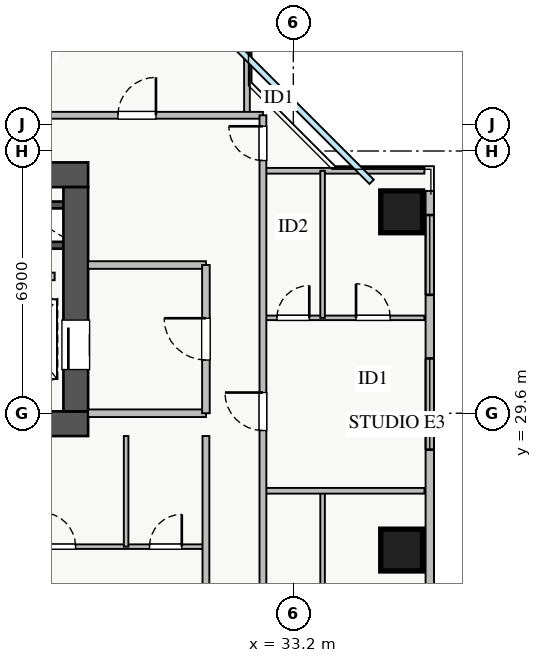
"""IFC4 building model, lengths in metres.
Left out: names, types, materials, properties, quantities, classifications, styles, units other than length and angle.
Written with IfcOpenShell. Run it as: python <this file> out.ifc"""

import sys

from ifc_helpers import new_model, si_unit, direction, frame, frame_2d, origin, origin_2d, place, context, subcontext, project, spatial, rectangle, extrude, source, transform, mapped, element, fill, save


model = new_model("IFC4")
c1 = context("Model", 3, precision=1e-05, world=origin(), true_north=direction((0.0, 1.0)))
c2 = subcontext(c1, "Body", "Model", "MODEL_VIEW")
j1 = project(units=[si_unit("LENGTHUNIT", "METRE"), si_unit("PLANEANGLEUNIT", "RADIAN")], contexts=[c1])
p1 = place(None, origin())
s1 = spatial("IfcSite", under=j1, at=p1, CompositionType="ELEMENT")
p2 = place(p1, origin())
s2 = spatial("IfcBuilding", under=s1, at=p2, CompositionType="ELEMENT")
p3 = place(p2, frame((0.0, 0.0, 97.0)))
s3 = spatial("IfcBuildingStorey", under=s2, at=p3, CompositionType="ELEMENT", Elevation=97.0)
for number, where, z_axis, x_axis in (
    (1, (25.8, 35.08, 0.0), (0.0, 0.0, 1.0), (1.0, 0.0, 0.0)),
    (2, (25.8, 34.02, 0.0), (0.0, 0.0, 1.0), (1.0, 0.0, 0.0)),
):
    element("IfcWall", number, at=place(p3, frame(where, z_axis=z_axis, x_axis=x_axis)), inside=s3, PredefinedType="SHEAR", context=c2, shape_type="SweptSolid", body=[
        extrude(rectangle(XDim=1.35, YDim=0.18, at=frame_2d((0.675, 0.0))), origin(), (0.0, 0.0, 1.0), 3.07),
    ])
p4 = place(p3, frame((10.2, 29.325, 0.0), z_axis=(0.0, 0.0, 1.0), x_axis=(1.0, 0.0, 0.0)))
e3 = element("IfcWall", 3, at=p4, inside=s3, PredefinedType="SHEAR", context=c2, shape_type="SweptSolid", body=[
    extrude(rectangle(XDim=17.6, YDim=0.65, at=frame_2d((8.8, 0.0))), origin(), (0.0, 0.0, 1.0), 3.25),
])
p5 = place(p3, frame((10.2, 35.875, 0.0), z_axis=(0.0, 0.0, 1.0), x_axis=(1.0, 0.0, 0.0)))
e4 = element("IfcWall", 4, at=p5, inside=s3, PredefinedType="SHEAR", context=c2, shape_type="SweptSolid", body=[
    extrude(rectangle(XDim=17.6, YDim=0.65, at=frame_2d((8.8, 0.0))), origin(), (0.0, 0.0, 1.0), 3.25),
])
p6 = place(p5, frame((1.15, 0.0, 0.0)))
e5 = element("IfcOpeningElement", 5, at=p6, cuts=e4, PredefinedType="OPENING", context=c2, shape_type="SweptSolid", body=[
    extrude(rectangle(XDim=1.1, YDim=2.05, at=frame_2d((0.55, 1.025))), frame((0.0, 0.335, 0.0), z_axis=(0.0, -1.0, 0.0), x_axis=(1.0, 0.0, 0.0)), (0.0, 0.0, 1.0), 0.67),
])
p7 = place(p5, frame((8.3, 0.0, 0.0)))
e6 = element("IfcOpeningElement", 6, at=p7, cuts=e4, PredefinedType="OPENING", context=c2, shape_type="SweptSolid", body=[
    extrude(rectangle(XDim=1.1, YDim=2.05, at=frame_2d((0.55, 1.025))), frame((0.0, 0.335, 0.0), z_axis=(0.0, -1.0, 0.0), x_axis=(1.0, 0.0, 0.0)), (0.0, 0.0, 1.0), 0.67),
])
p8 = place(p5, frame((4.9, 0.0, 0.0)))
e7 = element("IfcOpeningElement", 7, at=p8, cuts=e4, PredefinedType="OPENING", context=c2, shape_type="SweptSolid", body=[
    extrude(rectangle(XDim=1.1, YDim=2.05, at=frame_2d((0.55, 1.025))), frame((0.0, 0.335, 0.0), z_axis=(0.0, -1.0, 0.0), x_axis=(1.0, 0.0, 0.0)), (0.0, 0.0, 1.0), 0.67),
])
p9 = place(p5, frame((14.74, 0.0, 0.0)))
e8 = element("IfcOpeningElement", 8, at=p9, cuts=e4, PredefinedType="OPENING", context=c2, shape_type="SweptSolid", body=[
    extrude(rectangle(XDim=1.0, YDim=2.05, at=frame_2d((0.5, 1.025))), frame((0.0, 0.335, 0.0), z_axis=(0.0, -1.0, 0.0), x_axis=(1.0, 0.0, 0.0)), (0.0, 0.0, 1.0), 0.67),
])
p10 = place(p5, frame((10.175, 0.0, 0.0)))
e9 = element("IfcOpeningElement", 9, at=p10, cuts=e4, PredefinedType="OPENING", context=c2, shape_type="SweptSolid", body=[
    extrude(rectangle(XDim=1.0, YDim=2.05, at=frame_2d((0.5, 1.025))), frame((0.0, 0.335, 0.0), z_axis=(0.0, -1.0, 0.0), x_axis=(1.0, 0.0, 0.0)), (0.0, 0.0, 1.0), 0.67),
])
p11 = place(p5, frame((12.625, 0.0, 0.0)))
e10 = element("IfcOpeningElement", 10, at=p11, cuts=e4, PredefinedType="OPENING", context=c2, shape_type="SweptSolid", body=[
    extrude(rectangle(XDim=1.0, YDim=2.05, at=frame_2d((0.5, 1.025))), frame((0.0, 0.335, 0.0), z_axis=(0.0, -1.0, 0.0), x_axis=(1.0, 0.0, 0.0)), (0.0, 0.0, 1.0), 0.67),
])
p12 = place(p3, frame((27.475, 29.65, 0.0), z_axis=(0.0, 0.0, 1.0), x_axis=(0.0, 1.0, 0.0)))
e11 = element("IfcWall", 11, at=p12, inside=s3, PredefinedType="SHEAR", context=c2, shape_type="SweptSolid", body=[
    extrude(rectangle(XDim=5.9, YDim=0.65, at=frame_2d((2.95, 0.0))), origin(), (0.0, 0.0, 1.0), 3.25),
])
p13 = place(p12, frame((1.1, 0.0, 0.0)))
e12 = element("IfcOpeningElement", 12, at=p13, cuts=e11, PredefinedType="OPENING", context=c2, shape_type="SweptSolid", body=[
    extrude(rectangle(XDim=1.3, YDim=2.05, at=frame_2d((0.65, 1.025))), frame((0.0, 0.335, 0.0), z_axis=(0.0, -1.0, 0.0), x_axis=(1.0, 0.0, 0.0)), (0.0, 0.0, 1.0), 0.67),
])
m1 = source(origin(), c2, "Body", "SweptSolid", [
    extrude(rectangle(XDim=1.1, YDim=1.1, at=origin_2d()), origin(), (0.0, 0.0, 1.0), 3.25),
])
for number, where, z_axis, x_axis in (
    (13, (36.05, 26.0, 0.0), (0.0, 0.0, 1.0), (1.0, 0.0, 0.0)),
    (14, (36.05, 34.9, 0.0), (0.0, 0.0, 1.0), (1.0, 0.0, 0.0)),
):
    element("IfcColumn", number, at=place(p3, frame(where, z_axis=z_axis, x_axis=x_axis)), inside=s3, PredefinedType="COLUMN", context=c2, shape_type="MappedRepresentation", body=[
        mapped(m1, transform((0.0, 0.0, 0.0), x_axis=(1.0, 0.0, 0.0), y_axis=(0.0, 1.0, 0.0), z_axis=(0.0, 0.0, 1.0), scale=1.0)),
    ])
p14 = place(p3, frame((36.79, 10.55, 0.0), z_axis=(0.0, 0.0, 1.0), x_axis=(0.0, 1.0, 0.0)))
e15 = element("IfcWall", 15, at=p14, inside=s3, PredefinedType="STANDARD", context=c2, shape_type="SweptSolid", body=[
    extrude(rectangle(XDim=24.9, YDim=0.22, at=frame_2d((12.45, 0.0))), origin(), (0.0, 0.0, 1.0), 2.61),
])
p15 = place(p14, frame((1.912, 0.0, 0.9)))
e16 = element("IfcOpeningElement", 16, at=p15, cuts=e15, PredefinedType="OPENING", context=c2, shape_type="SweptSolid", body=[
    extrude(rectangle(XDim=2.4, YDim=1.48, at=frame_2d((1.2, 0.74))), frame((0.0, 0.12, 0.0), z_axis=(0.0, -1.0, 0.0), x_axis=(1.0, 0.0, 0.0)), (0.0, 0.0, 1.0), 0.24),
])
p16 = place(p14, frame((22.165, 0.0, 0.9)))
e17 = element("IfcOpeningElement", 17, at=p16, cuts=e15, PredefinedType="OPENING", context=c2, shape_type="SweptSolid", body=[
    extrude(rectangle(XDim=2.1, YDim=1.5, at=frame_2d((1.05, 0.75))), frame((0.0, 0.12, 0.0), z_axis=(0.0, -1.0, 0.0), x_axis=(1.0, 0.0, 0.0)), (0.0, 0.0, 1.0), 0.24),
])
p17 = place(p14, frame((18.093, 0.0, 0.9)))
e18 = element("IfcOpeningElement", 18, at=p17, cuts=e15, PredefinedType="OPENING", context=c2, shape_type="SweptSolid", body=[
    extrude(rectangle(XDim=2.4, YDim=1.5, at=frame_2d((1.2, 0.75))), frame((0.0, 0.12, 0.0), z_axis=(0.0, -1.0, 0.0), x_axis=(1.0, 0.0, 0.0)), (0.0, 0.0, 1.0), 0.24),
])
p18 = place(p14, frame((9.045, 0.0, 0.9)))
e19 = element("IfcOpeningElement", 19, at=p18, cuts=e15, PredefinedType="OPENING", context=c2, shape_type="SweptSolid", body=[
    extrude(rectangle(XDim=0.9, YDim=1.2, at=frame_2d((0.45, 0.6))), frame((0.0, 0.12, 0.0), z_axis=(0.0, -1.0, 0.0), x_axis=(1.0, 0.0, 0.0)), (0.0, 0.0, 1.0), 0.24),
])
for number, where, z_axis, x_axis in (
    (20, (27.8, 29.6, 0.0), (0.0, 0.0, 1.0), (1.0, 0.0, 0.0)),
    (21, (27.8, 33.5, 0.0), (0.0, 0.0, 1.0), (1.0, 0.0, 0.0)),
):
    element("IfcWall", number, at=place(p3, frame(where, z_axis=z_axis, x_axis=x_axis)), inside=s3, PredefinedType="PARTITIONING", context=c2, shape_type="SweptSolid", body=[
        extrude(rectangle(XDim=3.1, YDim=0.2, at=frame_2d((1.55, 0.0))), origin(), (0.0, 0.0, 1.0), 3.07),
    ])
p19 = place(p3, frame((30.9, 29.6, 0.0), z_axis=(0.0, 0.0, 1.0), x_axis=(0.0, 1.0, 0.0)))
e22 = element("IfcWall", 22, at=p19, inside=s3, PredefinedType="PARTITIONING", context=c2, shape_type="SweptSolid", body=[
    extrude(rectangle(XDim=3.9, YDim=0.2, at=frame_2d((1.95, 0.0))), origin(), (0.0, 0.0, 1.0), 3.07),
])
p20 = place(p19, frame((1.4, 0.0, 0.0)))
e23 = element("IfcOpeningElement", 23, at=p20, cuts=e22, PredefinedType="OPENING", context=c2, shape_type="SweptSolid", body=[
    extrude(rectangle(XDim=1.1, YDim=2.05, at=frame_2d((0.55, 1.025))), frame((0.0, 0.11, 0.0), z_axis=(0.0, -1.0, 0.0), x_axis=(1.0, 0.0, 0.0)), (0.0, 0.0, 1.0), 0.22),
])
p21 = place(p3, frame((21.75, 33.2, 0.0), z_axis=(0.0, 0.0, 1.0), x_axis=(1.0, 0.0, 0.0)))
e24 = element("IfcWall", 24, at=p21, inside=s3, PredefinedType="PARTITIONING", context=c2, shape_type="SweptSolid", body=[
    extrude(rectangle(XDim=5.17, YDim=0.2, at=frame_2d((2.585, 0.0))), origin(), (0.0, 0.0, 1.0), 3.07),
])
p22 = place(p3, frame((31.98, 37.44, 0.0), z_axis=(0.0, 0.0, 1.0), x_axis=(0.0, 1.0, 0.0)))
e25 = element("IfcWall", 25, at=p22, inside=s3, PredefinedType="PARTITIONING", context=c2, shape_type="SweptSolid", body=[
    extrude(rectangle(XDim=3.21, YDim=0.15, at=frame_2d((1.605, 0.0))), origin(), (0.0, 0.0, 1.0), 3.07),
])
p23 = place(p3, frame((8.82, 37.44, 0.0), z_axis=(0.0, 0.0, 1.0), x_axis=(1.0, 0.0, 0.0)))
e26 = element("IfcWall", 26, at=p23, inside=s3, PredefinedType="PARTITIONING", context=c2, shape_type="SweptSolid", body=[
    extrude(rectangle(XDim=23.58, YDim=0.18, at=frame_2d((11.79, 0.0))), origin(), (0.0, 0.0, 1.0), 3.07),
])
p24 = place(p23, frame((2.75, 0.0, 0.0)))
e27 = element("IfcOpeningElement", 27, at=p24, cuts=e26, PredefinedType="OPENING", context=c2, shape_type="SweptSolid", body=[
    extrude(rectangle(XDim=1.0, YDim=2.05, at=frame_2d((0.5, 1.025))), frame((0.0, 0.1, 0.0), z_axis=(0.0, -1.0, 0.0), x_axis=(1.0, 0.0, 0.0)), (0.0, 0.0, 1.0), 0.2),
])
p25 = place(p23, frame((7.89, 0.0, 0.0)))
e28 = element("IfcOpeningElement", 28, at=p25, cuts=e26, PredefinedType="OPENING", context=c2, shape_type="SweptSolid", body=[
    extrude(rectangle(XDim=1.0, YDim=2.05, at=frame_2d((0.5, 1.025))), frame((0.0, 0.1, 0.0), z_axis=(0.0, -1.0, 0.0), x_axis=(1.0, 0.0, 0.0)), (0.0, 0.0, 1.0), 0.2),
])
p26 = place(p23, frame((13.325, 0.0, 0.0)))
e29 = element("IfcOpeningElement", 29, at=p26, cuts=e26, PredefinedType="OPENING", context=c2, shape_type="SweptSolid", body=[
    extrude(rectangle(XDim=1.0, YDim=2.05, at=frame_2d((0.5, 1.025))), frame((0.0, 0.1, 0.0), z_axis=(0.0, -1.0, 0.0), x_axis=(1.0, 0.0, 0.0)), (0.0, 0.0, 1.0), 0.2),
])
p27 = place(p23, frame((19.765, 0.0, 0.0)))
e30 = element("IfcOpeningElement", 30, at=p27, cuts=e26, PredefinedType="OPENING", context=c2, shape_type="SweptSolid", body=[
    extrude(rectangle(XDim=1.0, YDim=2.05, at=frame_2d((0.5, 1.025))), frame((0.0, 0.1, 0.0), z_axis=(0.0, -1.0, 0.0), x_axis=(1.0, 0.0, 0.0)), (0.0, 0.0, 1.0), 0.2),
])
p28 = place(p3, frame((32.4, 35.98, 0.0), z_axis=(0.0, 0.0, 1.0), x_axis=(1.0, 0.0, 0.0)))
e31 = element("IfcWall", 31, at=p28, inside=s3, PredefinedType="PARTITIONING", context=c2, shape_type="SweptSolid", body=[
    extrude(rectangle(XDim=4.25, YDim=0.15, at=frame_2d((2.125, 0.0))), origin(), (0.0, 0.0, 1.0), 3.07),
])
p29 = place(p3, frame((33.97, 23.1, 0.0), z_axis=(0.0, 0.0, 1.0), x_axis=(0.0, 1.0, 0.0)))
e32 = element("IfcWall", 32, at=p29, inside=s3, PredefinedType="PLUMBINGWALL", context=c2, shape_type="SweptSolid", body=[
    extrude(rectangle(XDim=4.46, YDim=0.12, at=frame_2d((2.23, 0.0))), origin(), (0.0, 0.0, 1.0), 3.07),
])
p30 = place(p3, frame((32.4, 32.11, 0.0), z_axis=(0.0, 0.0, 1.0), x_axis=(1.0, 0.0, 0.0)))
e33 = element("IfcWall", 33, at=p30, inside=s3, PredefinedType="PLUMBINGWALL", context=c2, shape_type="SweptSolid", body=[
    extrude(rectangle(XDim=4.25, YDim=0.12, at=frame_2d((2.125, 0.0))), origin(), (0.0, 0.0, 1.0), 3.07),
])
p31 = place(p30, frame((0.37, 0.0, 0.0)))
e34 = element("IfcOpeningElement", 34, at=p31, cuts=e33, PredefinedType="OPENING", context=c2, shape_type="SweptSolid", body=[
    extrude(rectangle(XDim=0.85, YDim=2.05, at=frame_2d((0.425, 1.025))), frame((0.0, 0.07, 0.0), z_axis=(0.0, -1.0, 0.0), x_axis=(1.0, 0.0, 0.0)), (0.0, 0.0, 1.0), 0.14),
])
p32 = place(p30, frame((2.45, 0.0, 0.0)))
e35 = element("IfcOpeningElement", 35, at=p32, cuts=e33, PredefinedType="OPENING", context=c2, shape_type="SweptSolid", body=[
    extrude(rectangle(XDim=0.9, YDim=2.05, at=frame_2d((0.45, 1.025))), frame((0.0, 0.07, 0.0), z_axis=(0.0, -1.0, 0.0), x_axis=(1.0, 0.0, 0.0)), (0.0, 0.0, 1.0), 0.14),
])
p33 = place(p3, frame((33.97, 32.11, 0.0), z_axis=(0.0, 0.0, 1.0), x_axis=(0.0, 1.0, 0.0)))
e36 = element("IfcWall", 36, at=p33, inside=s3, PredefinedType="PLUMBINGWALL", context=c2, shape_type="SweptSolid", body=[
    extrude(rectangle(XDim=3.87, YDim=0.12, at=frame_2d((1.935, 0.0))), origin(), (0.0, 0.0, 1.0), 3.07),
])
p34 = place(p3, frame((32.4, 27.56, 0.0), z_axis=(0.0, 0.0, 1.0), x_axis=(1.0, 0.0, 0.0)))
e37 = element("IfcWall", 37, at=p34, inside=s3, PredefinedType="PARTITIONING", context=c2, shape_type="SweptSolid", body=[
    extrude(rectangle(XDim=4.25, YDim=0.15, at=frame_2d((2.125, 0.0))), origin(), (0.0, 0.0, 1.0), 3.07),
])
p35 = place(p3, frame((32.4, 8.31, 0.0), z_axis=(0.0, 0.0, 1.0), x_axis=(0.0, 1.0, 0.0)))
e38 = element("IfcWall", 38, at=p35, inside=s3, PredefinedType="PARTITIONING", context=c2, shape_type="SweptSolid", body=[
    extrude(rectangle(XDim=29.13, YDim=0.18, at=frame_2d((14.565, 0.0))), origin(), (0.0, 0.0, 1.0), 3.07),
])
p36 = place(p35, frame((27.94, 0.0, 0.0)))
e39 = element("IfcOpeningElement", 39, at=p36, cuts=e38, PredefinedType="OPENING", context=c2, shape_type="SweptSolid", body=[
    extrude(rectangle(XDim=0.9, YDim=2.05, at=frame_2d((0.45, 1.025))), frame((0.0, 0.1, 0.0), z_axis=(0.0, -1.0, 0.0), x_axis=(1.0, 0.0, 0.0)), (0.0, 0.0, 1.0), 0.2),
])
p37 = place(p35, frame((0.415, 0.0, 0.0)))
e40 = element("IfcOpeningElement", 40, at=p37, cuts=e38, PredefinedType="OPENING", context=c2, shape_type="SweptSolid", body=[
    extrude(rectangle(XDim=0.9, YDim=2.05, at=frame_2d((0.45, 1.025))), frame((0.0, 0.1, 0.0), z_axis=(0.0, -1.0, 0.0), x_axis=(1.0, 0.0, 0.0)), (0.0, 0.0, 1.0), 0.2),
])
p38 = place(p35, frame((5.88, 0.0, 0.0)))
e41 = element("IfcOpeningElement", 41, at=p38, cuts=e38, PredefinedType="OPENING", context=c2, shape_type="SweptSolid", body=[
    extrude(rectangle(XDim=1.0, YDim=2.05, at=frame_2d((0.5, 1.025))), frame((0.0, 0.1, 0.0), z_axis=(0.0, -1.0, 0.0), x_axis=(1.0, 0.0, 0.0)), (0.0, 0.0, 1.0), 0.2),
])
p39 = place(p35, frame((12.23, 0.0, 0.0)))
e42 = element("IfcOpeningElement", 42, at=p39, cuts=e38, PredefinedType="OPENING", context=c2, shape_type="SweptSolid", body=[
    extrude(rectangle(XDim=1.0, YDim=2.05, at=frame_2d((0.5, 1.025))), frame((0.0, 0.1, 0.0), z_axis=(0.0, -1.0, 0.0), x_axis=(1.0, 0.0, 0.0)), (0.0, 0.0, 1.0), 0.2),
])
p40 = place(p35, frame((20.835, 0.0, 0.0)))
e43 = element("IfcOpeningElement", 43, at=p40, cuts=e38, PredefinedType="OPENING", context=c2, shape_type="SweptSolid", body=[
    extrude(rectangle(XDim=1.0, YDim=2.05, at=frame_2d((0.5, 1.025))), frame((0.0, 0.1, 0.0), z_axis=(0.0, -1.0, 0.0), x_axis=(1.0, 0.0, 0.0)), (0.0, 0.0, 1.0), 0.2),
])
p41 = place(p3, frame((25.22, 26.09, 0.0), z_axis=(0.0, 0.0, 1.0), x_axis=(1.0, 0.0, 0.0)))
e44 = element("IfcWall", 44, at=p41, inside=s3, PredefinedType="PLUMBINGWALL", context=c2, shape_type="SweptSolid", body=[
    extrude(rectangle(XDim=5.68, YDim=0.12, at=frame_2d((2.84, 0.0))), origin(), (0.0, 0.0, 1.0), 2.625),
])
p42 = place(p41, frame((1.35, 0.0, 0.0)))
e45 = element("IfcOpeningElement", 45, at=p42, cuts=e44, PredefinedType="OPENING", context=c2, shape_type="SweptSolid", body=[
    extrude(rectangle(XDim=0.9, YDim=2.05, at=frame_2d((0.45, 1.025))), frame((0.0, 0.07, 0.0), z_axis=(0.0, -1.0, 0.0), x_axis=(1.0, 0.0, 0.0)), (0.0, 0.0, 1.0), 0.14),
])
p43 = place(p41, frame((4.195, 0.0, 0.0)))
e46 = element("IfcOpeningElement", 46, at=p43, cuts=e44, PredefinedType="OPENING", context=c2, shape_type="SweptSolid", body=[
    extrude(rectangle(XDim=0.85, YDim=2.05, at=frame_2d((0.425, 1.025))), frame((0.0, 0.07, 0.0), z_axis=(0.0, -1.0, 0.0), x_axis=(1.0, 0.0, 0.0)), (0.0, 0.0, 1.0), 0.14),
])
p44 = place(p3, frame((28.8, 26.09, 0.0), z_axis=(0.0, 0.0, 1.0), x_axis=(0.0, 1.0, 0.0)))
e47 = element("IfcWall", 47, at=p44, inside=s3, PredefinedType="PLUMBINGWALL", context=c2, shape_type="SweptSolid", body=[
    extrude(rectangle(XDim=2.91, YDim=0.12, at=frame_2d((1.455, 0.0))), origin(), (0.0, 0.0, 1.0), 3.07),
])
p45 = place(p3, frame((30.9, 17.0, 0.0), z_axis=(0.0, 0.0, 1.0), x_axis=(0.0, 1.0, 0.0)))
e48 = element("IfcWall", 48, at=p45, inside=s3, PredefinedType="PARTITIONING", context=c2, shape_type="SweptSolid", body=[
    extrude(rectangle(XDim=12.0, YDim=0.18, at=frame_2d((6.0, 0.0))), origin(), (0.0, 0.0, 1.0), 3.07),
])
p46 = place(p45, frame((0.84, 0.0, 0.0)))
e49 = element("IfcOpeningElement", 49, at=p46, cuts=e48, PredefinedType="OPENING", context=c2, shape_type="SweptSolid", body=[
    extrude(rectangle(XDim=1.0, YDim=2.05, at=frame_2d((0.5, 1.025))), frame((0.0, 0.1, 0.0), z_axis=(0.0, -1.0, 0.0), x_axis=(1.0, 0.0, 0.0)), (0.0, 0.0, 1.0), 0.2),
])
p47 = place(p45, frame((6.69, 0.0, 0.0)))
e50 = element("IfcOpeningElement", 50, at=p47, cuts=e48, PredefinedType="OPENING", context=c2, shape_type="SweptSolid", body=[
    extrude(rectangle(XDim=1.0, YDim=2.05, at=frame_2d((0.5, 1.025))), frame((0.0, 0.1, 0.0), z_axis=(0.0, -1.0, 0.0), x_axis=(1.0, 0.0, 0.0)), (0.0, 0.0, 1.0), 0.2),
])
m2 = source(origin(), c2, "Body", "SweptSolid", [
    extrude(rectangle(XDim=2.1, YDim=1.5, at=frame_2d((1.05, 0.75))), frame((0.0, 0.03, 0.0), z_axis=(0.0, -1.0, 0.0), x_axis=(1.0, 0.0, 0.0)), (0.0, 0.0, 1.0), 0.06),
])
p48 = place(p16, origin())
e51 = element("IfcWindow", 51, at=p48, inside=s3, PartitioningType="TRIPLE_PANEL_VERTICAL", PredefinedType="WINDOW", context=c2, shape_type="MappedRepresentation", body=[
    mapped(m2, transform((0.0, 0.0, 0.0), x_axis=(1.0, 0.0, 0.0), y_axis=(0.0, 1.0, 0.0), z_axis=(0.0, 0.0, 1.0), scale=1.0)),
])
fill(e17, e51)
m3 = source(origin(), c2, "Body", "SweptSolid", [
    extrude(rectangle(XDim=1.3, YDim=2.05, at=frame_2d((0.65, 1.025))), frame((0.0, 0.025, 0.0), z_axis=(0.0, -1.0, 0.0), x_axis=(1.0, 0.0, 0.0)), (0.0, 0.0, 1.0), 0.05),
])
p49 = place(p13, origin())
e52 = element("IfcDoor", 52, at=p49, inside=s3, OperationType="SLIDING_TO_LEFT", PredefinedType="DOOR", context=c2, shape_type="MappedRepresentation", body=[
    mapped(m3, transform((0.0, 0.0, 0.0), x_axis=(1.0, 0.0, 0.0), y_axis=(0.0, 1.0, 0.0), z_axis=(0.0, 0.0, 1.0), scale=1.0)),
])
fill(e12, e52)
m4 = source(origin(), c2, "Body", "SweptSolid", [
    extrude(rectangle(XDim=1.1, YDim=2.05, at=frame_2d((0.55, 1.025))), frame((0.0, 0.025, 0.0), z_axis=(0.0, -1.0, 0.0), x_axis=(1.0, 0.0, 0.0)), (0.0, 0.0, 1.0), 0.05),
])
p50 = place(p20, origin())
e53 = element("IfcDoor", 53, at=p50, inside=s3, OperationType="SINGLE_SWING_RIGHT", PredefinedType="DOOR", context=c2, shape_type="MappedRepresentation", body=[
    mapped(m4, transform((0.0, 0.0, 0.0), x_axis=(1.0, 0.0, 0.0), y_axis=(0.0, 1.0, 0.0), z_axis=(0.0, 0.0, 1.0), scale=1.0)),
])
fill(e23, e53)
m5 = source(origin(), c2, "Body", "SweptSolid", [
    extrude(rectangle(XDim=1.0, YDim=2.05, at=frame_2d((0.5, 1.025))), frame((0.0, 0.025, 0.0), z_axis=(0.0, -1.0, 0.0), x_axis=(1.0, 0.0, 0.0)), (0.0, 0.0, 1.0), 0.05),
])
p51 = place(p27, origin())
e54 = element("IfcDoor", 54, at=p51, inside=s3, OperationType="SINGLE_SWING_RIGHT", PredefinedType="DOOR", context=c2, shape_type="MappedRepresentation", body=[
    mapped(m5, transform((0.0, 0.0, 0.0), x_axis=(1.0, 0.0, 0.0), y_axis=(0.0, 1.0, 0.0), z_axis=(0.0, 0.0, 1.0), scale=1.0)),
])
fill(e30, e54)
m6 = source(origin(), c2, "Body", "SweptSolid", [
    extrude(rectangle(XDim=0.85, YDim=2.05, at=frame_2d((0.425, 1.025))), frame((0.0, 0.025, 0.0), z_axis=(0.0, -1.0, 0.0), x_axis=(1.0, 0.0, 0.0)), (0.0, 0.0, 1.0), 0.05),
])
p52 = place(p31, origin())
e55 = element("IfcDoor", 55, at=p52, inside=s3, OperationType="SINGLE_SWING_RIGHT", PredefinedType="DOOR", context=c2, shape_type="MappedRepresentation", body=[
    mapped(m6, transform((0.0, 0.0, 0.0), x_axis=(1.0, 0.0, 0.0), y_axis=(0.0, 1.0, 0.0), z_axis=(0.0, 0.0, 1.0), scale=1.0)),
])
fill(e34, e55)
m7 = source(origin(), c2, "Body", "SweptSolid", [
    extrude(rectangle(XDim=0.9, YDim=2.05, at=frame_2d((0.45, 1.025))), frame((0.0, 0.025, 0.0), z_axis=(0.0, -1.0, 0.0), x_axis=(1.0, 0.0, 0.0)), (0.0, 0.0, 1.0), 0.05),
])
p53 = place(p32, origin())
e56 = element("IfcDoor", 56, at=p53, inside=s3, OperationType="SINGLE_SWING_LEFT", PredefinedType="DOOR", context=c2, shape_type="MappedRepresentation", body=[
    mapped(m7, transform((0.0, 0.0, 0.0), x_axis=(1.0, 0.0, 0.0), y_axis=(0.0, 1.0, 0.0), z_axis=(0.0, 0.0, 1.0), scale=1.0)),
])
fill(e35, e56)
p54 = place(p36, origin())
e57 = element("IfcDoor", 57, at=p54, inside=s3, OperationType="SINGLE_SWING_RIGHT", PredefinedType="DOOR", context=c2, shape_type="MappedRepresentation", body=[
    mapped(m7, transform((0.0, 0.0, 0.0), x_axis=(1.0, 0.0, 0.0), y_axis=(0.0, 1.0, 0.0), z_axis=(0.0, 0.0, 1.0), scale=1.0)),
])
fill(e39, e57)
p55 = place(p40, origin())
e58 = element("IfcDoor", 58, at=p55, inside=s3, OperationType="SINGLE_SWING_RIGHT", PredefinedType="DOOR", context=c2, shape_type="MappedRepresentation", body=[
    mapped(m5, transform((0.0, 0.0, 0.0), x_axis=(1.0, 0.0, 0.0), y_axis=(0.0, 1.0, 0.0), z_axis=(0.0, 0.0, 1.0), scale=1.0)),
])
fill(e43, e58)
p56 = place(p42, origin())
e59 = element("IfcDoor", 59, at=p56, inside=s3, OperationType="SINGLE_SWING_LEFT", PredefinedType="DOOR", context=c2, shape_type="MappedRepresentation", body=[
    mapped(m7, transform((0.0, 0.0, 0.0), x_axis=(1.0, 0.0, 0.0), y_axis=(0.0, 1.0, 0.0), z_axis=(0.0, 0.0, 1.0), scale=1.0)),
])
fill(e45, e59)
p57 = place(p43, origin())
e60 = element("IfcDoor", 60, at=p57, inside=s3, OperationType="SINGLE_SWING_RIGHT", PredefinedType="DOOR", context=c2, shape_type="MappedRepresentation", body=[
    mapped(m6, transform((0.0, 0.0, 0.0), x_axis=(1.0, 0.0, 0.0), y_axis=(0.0, 1.0, 0.0), z_axis=(0.0, 0.0, 1.0), scale=1.0)),
])
fill(e46, e60)
m8 = source(origin(), c2, "Body", "SweptSolid", [
    extrude(rectangle(XDim=2.4, YDim=1.5, at=frame_2d((1.2, 0.75))), frame((0.0, 0.03, 0.0), z_axis=(0.0, -1.0, 0.0), x_axis=(1.0, 0.0, 0.0)), (0.0, 0.0, 1.0), 0.06),
])
p58 = place(p17, origin())
e61 = element("IfcWindow", 61, at=p58, inside=s3, PartitioningType="TRIPLE_PANEL_VERTICAL", PredefinedType="WINDOW", context=c2, shape_type="MappedRepresentation", body=[
    mapped(m8, transform((0.0, 0.0, 0.0), x_axis=(1.0, 0.0, 0.0), y_axis=(0.0, 1.0, 0.0), z_axis=(0.0, 0.0, 1.0), scale=1.0)),
])
fill(e18, e61)
save(model, sys.argv[1])
